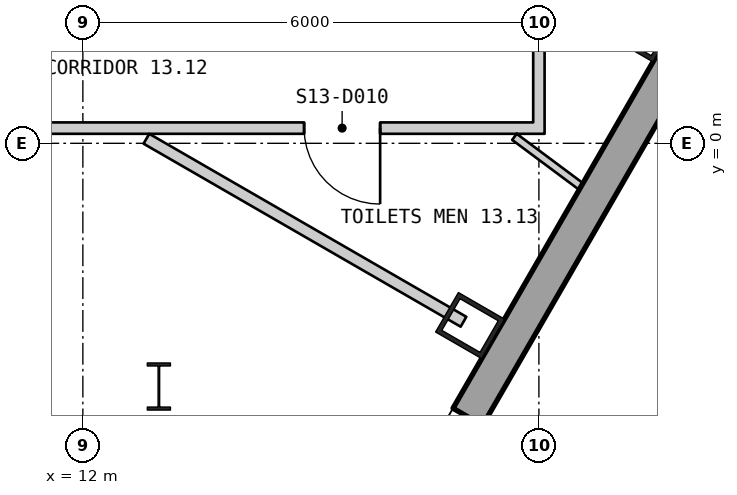
"""IFC4 building model, lengths in metres.
Left out: names, types, materials, properties, quantities, classifications, styles, units other than length and angle.
Written with IfcOpenShell. Run it as: python <this file> out.ifc"""

import sys

from ifc_helpers import new_model, si_unit, direction, frame, frame_2d, origin, origin_2d, place, context, subcontext, project, spatial, polyline, rectangle, hollow_rectangle, i_section, outline, extrude, element, fill, save


model = new_model("IFC4")
c1 = context("Model", 3, precision=1e-05, world=origin(), true_north=direction((0.0, 1.0)))
c2 = subcontext(c1, "Body", "Model", "MODEL_VIEW")
j1 = project(units=[si_unit("LENGTHUNIT", "METRE"), si_unit("PLANEANGLEUNIT", "RADIAN")], contexts=[c1])
p1 = place(None, origin())
s1 = spatial("IfcSite", under=j1, at=p1, CompositionType="ELEMENT")
p2 = place(p1, origin())
s2 = spatial("IfcBuilding", under=s1, at=p2, CompositionType="ELEMENT")
p3 = place(p2, frame((0.0, 0.0, 174.9)))
s3 = spatial("IfcBuildingStorey", under=s2, at=p3, CompositionType="ELEMENT", Elevation=174.9)
for number, where, z_axis, x_axis in (
    (1, (17.094, -2.398, 0.0), (0.0, 0.0, 1.0), (0.5, 0.866, 0.0)),
    (2, (19.348, 1.506, 0.0), (0.0, 0.0, 1.0), (0.5, 0.866, 0.0)),
):
    element("IfcColumn", number, at=place(p3, frame(where, z_axis=z_axis, x_axis=x_axis)), inside=s3, PredefinedType="COLUMN", context=c2, shape_type="SweptSolid", body=[
        extrude(hollow_rectangle(XDim=0.6, YDim=0.7, WallThickness=0.06, at=origin_2d()), origin(), (0.0, 0.0, 1.0), 3.9),
    ])
p4 = place(p3, frame((13.0, -3.2, 0.0), z_axis=(0.0, 0.0, 1.0), x_axis=(1.0, 0.0, 0.0)))
e3 = element("IfcColumn", 3, at=p4, inside=s3, PredefinedType="COLUMN", context=c2, shape_type="SweptSolid", body=[
    extrude(i_section(OverallWidth=0.305, OverallDepth=0.62, WebThickness=0.021, FlangeThickness=0.04, at=origin_2d()), origin(), (0.0, 0.0, 1.0), 3.9),
])
p5 = place(p3, frame((3.9, -26.401, -0.18), z_axis=(0.0, 0.0, 1.0), x_axis=(0.500000335318, 0.866025210188, 0.0)))
e4 = element("IfcWall", 4, at=p5, inside=s3, PredefinedType="SOLIDWALL", context=c2, shape_type="SweptSolid", body=[
    extrude(outline(polyline([(-0.13, -0.225), (45.88, -0.225), (45.62, 0.225), (0.13, 0.225), (-0.13, -0.225)])), origin(), (0.0, 0.0, 1.0), 3.68),
])
p6 = place(p5, frame((1.425, 0.0, 1.08)))
e5 = element("IfcOpeningElement", 5, at=p6, cuts=e4, PredefinedType="OPENING", context=c2, shape_type="SweptSolid", body=[
    extrude(rectangle(XDim=2.4, YDim=2.0, at=frame_2d((1.2, 1.0))), frame((0.0, 0.235, 0.0), z_axis=(0.0, -1.0, 0.0), x_axis=(1.0, 0.0, 0.0)), (0.0, 0.0, 1.0), 0.47),
])
p7 = place(p5, frame((5.895, 0.0, 1.08)))
e6 = element("IfcOpeningElement", 6, at=p7, cuts=e4, PredefinedType="OPENING", context=c2, shape_type="SweptSolid", body=[
    extrude(rectangle(XDim=2.4, YDim=2.0, at=frame_2d((1.2, 1.0))), frame((0.0, 0.235, 0.0), z_axis=(0.0, -1.0, 0.0), x_axis=(1.0, 0.0, 0.0)), (0.0, 0.0, 1.0), 0.47),
])
p8 = place(p5, frame((10.403, 0.0, 1.08)))
e7 = element("IfcOpeningElement", 7, at=p8, cuts=e4, PredefinedType="OPENING", context=c2, shape_type="SweptSolid", body=[
    extrude(rectangle(XDim=2.4, YDim=2.0, at=frame_2d((1.2, 1.0))), frame((0.0, 0.235, 0.0), z_axis=(0.0, -1.0, 0.0), x_axis=(1.0, 0.0, 0.0)), (0.0, 0.0, 1.0), 0.47),
])
p9 = place(p5, frame((14.912, 0.0, 1.08)))
e8 = element("IfcOpeningElement", 8, at=p9, cuts=e4, PredefinedType="OPENING", context=c2, shape_type="SweptSolid", body=[
    extrude(rectangle(XDim=2.4, YDim=2.0, at=frame_2d((1.2, 1.0))), frame((0.0, 0.235, 0.0), z_axis=(0.0, -1.0, 0.0), x_axis=(1.0, 0.0, 0.0)), (0.0, 0.0, 1.0), 0.47),
])
p10 = place(p5, frame((19.421, 0.0, 1.08)))
e9 = element("IfcOpeningElement", 9, at=p10, cuts=e4, PredefinedType="OPENING", context=c2, shape_type="SweptSolid", body=[
    extrude(rectangle(XDim=2.4, YDim=2.0, at=frame_2d((1.2, 1.0))), frame((0.0, 0.235, 0.0), z_axis=(0.0, -1.0, 0.0), x_axis=(1.0, 0.0, 0.0)), (0.0, 0.0, 1.0), 0.47),
])
p11 = place(p5, frame((23.929, 0.0, 1.08)))
e10 = element("IfcOpeningElement", 10, at=p11, cuts=e4, PredefinedType="OPENING", context=c2, shape_type="SweptSolid", body=[
    extrude(rectangle(XDim=2.4, YDim=2.0, at=frame_2d((1.2, 1.0))), frame((0.0, 0.235, 0.0), z_axis=(0.0, -1.0, 0.0), x_axis=(1.0, 0.0, 0.0)), (0.0, 0.0, 1.0), 0.47),
])
p12 = place(p5, frame((37.455, 0.0, 1.08)))
e11 = element("IfcOpeningElement", 11, at=p12, cuts=e4, PredefinedType="OPENING", context=c2, shape_type="SweptSolid", body=[
    extrude(rectangle(XDim=2.4, YDim=2.0, at=frame_2d((1.2, 1.0))), frame((0.0, 0.235, 0.0), z_axis=(0.0, -1.0, 0.0), x_axis=(1.0, 0.0, 0.0)), (0.0, 0.0, 1.0), 0.47),
])
p13 = place(p5, frame((41.925, 0.0, 1.08)))
e12 = element("IfcOpeningElement", 12, at=p13, cuts=e4, PredefinedType="OPENING", context=c2, shape_type="SweptSolid", body=[
    extrude(rectangle(XDim=2.4, YDim=2.0, at=frame_2d((1.2, 1.0))), frame((0.0, 0.235, 0.0), z_axis=(0.0, -1.0, 0.0), x_axis=(1.0, 0.0, 0.0)), (0.0, 0.0, 1.0), 0.47),
])
p14 = place(p3, frame((7.02, 0.2, 0.0), z_axis=(0.0, 0.0, 1.0), x_axis=(1.0, 0.0, 0.0)))
e13 = element("IfcWall", 13, at=p14, inside=s3, PredefinedType="PARTITIONING", context=c2, shape_type="SweptSolid", body=[
    extrude(rectangle(XDim=10.905, YDim=0.15, at=frame_2d((5.452, 0.0))), origin(), (0.0, 0.0, 1.0), 3.7),
])
p15 = place(p14, frame((7.891, 0.0, 0.0)))
e14 = element("IfcOpeningElement", 14, at=p15, cuts=e13, PredefinedType="OPENING", context=c2, shape_type="SweptSolid", body=[
    extrude(rectangle(XDim=1.0, YDim=2.1, at=frame_2d((0.5, 1.05))), frame((0.0, 0.085, 0.0), z_axis=(0.0, -1.0, 0.0), x_axis=(1.0, 0.0, 0.0)), (0.0, 0.0, 1.0), 0.17),
])
p16 = place(p3, frame((12.836, 0.06, 0.0), z_axis=(0.0, 0.0, 1.0), x_axis=(0.866088799389, -0.499890179513, 0.0)))
e15 = element("IfcWall", 15, at=p16, inside=s3, PredefinedType="PARTITIONING", context=c2, shape_type="SweptSolid", body=[
    extrude(rectangle(XDim=4.817, YDim=0.15, at=frame_2d((2.409, 0.0))), origin(), (0.0, 0.0, 1.0), 3.7),
])
p17 = place(p3, frame((17.678, 0.085, 0.0), z_axis=(0.0, 0.0, 1.0), x_axis=(0.8020803948, -0.597216075033, 0.0)))
e16 = element("IfcWall", 16, at=p17, inside=s3, PredefinedType="PARTITIONING", context=c2, shape_type="SweptSolid", body=[
    extrude(rectangle(XDim=1.093, YDim=0.1, at=frame_2d((0.547, 0.0))), origin(), (0.0, 0.0, 1.0), 3.7),
])
p18 = place(p3, frame((18.0, 0.125, 0.0), z_axis=(0.0, 0.0, 1.0), x_axis=(0.0, 1.0, 0.0)))
e17 = element("IfcWall", 17, at=p18, inside=s3, PredefinedType="PARTITIONING", context=c2, shape_type="SweptSolid", body=[
    extrude(rectangle(XDim=12.531, YDim=0.15, at=frame_2d((6.266, 0.0))), origin(), (0.0, 0.0, 1.0), 3.7),
])
p19 = place(p18, frame((2.51, 0.0, 0.0)))
e18 = element("IfcOpeningElement", 18, at=p19, cuts=e17, PredefinedType="OPENING", context=c2, shape_type="SweptSolid", body=[
    extrude(rectangle(XDim=1.0, YDim=2.1, at=frame_2d((0.5, 1.05))), frame((0.0, 0.085, 0.0), z_axis=(0.0, -1.0, 0.0), x_axis=(1.0, 0.0, 0.0)), (0.0, 0.0, 1.0), 0.17),
])
p20 = place(p18, frame((5.114, 0.0, 0.0)))
e19 = element("IfcOpeningElement", 19, at=p20, cuts=e17, PredefinedType="OPENING", context=c2, shape_type="SweptSolid", body=[
    extrude(rectangle(XDim=1.0, YDim=2.1, at=frame_2d((0.5, 1.05))), frame((0.0, 0.085, 0.0), z_axis=(0.0, -1.0, 0.0), x_axis=(1.0, 0.0, 0.0)), (0.0, 0.0, 1.0), 0.17),
])
p21 = place(p11, origin())
e20 = element("IfcWindow", 20, at=p21, inside=s3, PartitioningType="SINGLE_PANEL", PredefinedType="WINDOW", context=c2, shape_type="SweptSolid", body=[
    extrude(rectangle(XDim=2.4, YDim=2.0, at=frame_2d((1.2, 1.0))), frame((0.0, 0.105, 0.0), z_axis=(0.0, -1.0, 0.0), x_axis=(1.0, 0.0, 0.0)), (0.0, 0.0, 1.0), 0.06),
])
fill(e10, e20)
p22 = place(p15, origin())
e21 = element("IfcDoor", 21, at=p22, inside=s3, OperationType="SINGLE_SWING_RIGHT", PredefinedType="DOOR", context=c2, shape_type="SweptSolid", body=[
    extrude(rectangle(XDim=1.0, YDim=2.1, at=frame_2d((0.5, 1.05))), frame((0.0, 0.025, 0.0), z_axis=(0.0, -1.0, 0.0), x_axis=(1.0, 0.0, 0.0)), (0.0, 0.0, 1.0), 0.05),
])
fill(e14, e21)
save(model, sys.argv[1])
